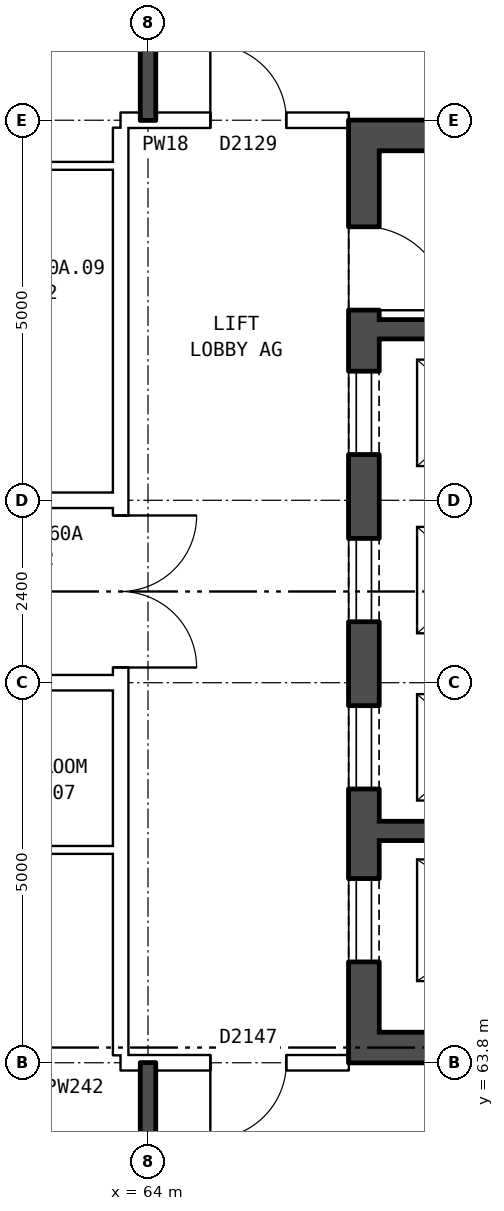
"""IFC4 building model, lengths in metres.
Left out: names, types, materials, properties, quantities, classifications, styles, units other than length and angle.
Written with IfcOpenShell. Run it as: python <this file> out.ifc"""

import sys

from ifc_helpers import new_model, si_unit, direction, frame, frame_2d, origin, place, context, subcontext, project, spatial, rectangle, extrude, element, fill, save


model = new_model("IFC4")
c1 = context("Model", 3, precision=1e-05, world=origin(), true_north=direction((0.0, 1.0)))
c2 = subcontext(c1, "Body", "Model", "MODEL_VIEW")
j1 = project(units=[si_unit("LENGTHUNIT", "METRE"), si_unit("PLANEANGLEUNIT", "RADIAN")], contexts=[c1])
p1 = place(None, origin())
s1 = spatial("IfcSite", under=j1, at=p1, CompositionType="ELEMENT")
p2 = place(p1, origin())
s2 = spatial("IfcBuilding", under=s1, at=p2, CompositionType="ELEMENT")
p3 = place(p2, frame((0.0, 0.0, 212.1)))
s3 = spatial("IfcBuildingStorey", under=s2, at=p3, CompositionType="ELEMENT", Elevation=212.1)
p4 = place(p3, frame((66.84, 63.8, 0.0), z_axis=(0.0, 0.0, 1.0), x_axis=(0.0, 1.0, 0.0)))
e1 = element("IfcWall", 1, at=p4, inside=s3, PredefinedType="SHEAR", context=c2, shape_type="SweptSolid", body=[
    extrude(rectangle(XDim=12.4, YDim=0.4, at=frame_2d((6.2, 0.0))), origin(), (0.0, 0.0, 1.0), 2.85),
])
p5 = place(p4, frame((1.325, 0.0, 0.0)))
e2 = element("IfcOpeningElement", 2, at=p5, cuts=e1, PredefinedType="OPENING", context=c2, shape_type="SweptSolid", body=[
    extrude(rectangle(XDim=1.1, YDim=2.1, at=frame_2d((0.55, 1.05))), frame((0.0, 0.21, 0.0), z_axis=(0.0, -1.0, 0.0), x_axis=(1.0, 0.0, 0.0)), (0.0, 0.0, 1.0), 0.42),
])
p6 = place(p4, frame((3.6, 0.0, 0.0)))
e3 = element("IfcOpeningElement", 3, at=p6, cuts=e1, PredefinedType="OPENING", context=c2, shape_type="SweptSolid", body=[
    extrude(rectangle(XDim=1.1, YDim=2.1, at=frame_2d((0.55, 1.05))), frame((0.0, 0.21, 0.0), z_axis=(0.0, -1.0, 0.0), x_axis=(1.0, 0.0, 0.0)), (0.0, 0.0, 1.0), 0.42),
])
p7 = place(p4, frame((5.8, 0.0, 0.0)))
e4 = element("IfcOpeningElement", 4, at=p7, cuts=e1, PredefinedType="OPENING", context=c2, shape_type="SweptSolid", body=[
    extrude(rectangle(XDim=1.1, YDim=2.1, at=frame_2d((0.55, 1.05))), frame((0.0, 0.21, 0.0), z_axis=(0.0, -1.0, 0.0), x_axis=(1.0, 0.0, 0.0)), (0.0, 0.0, 1.0), 0.42),
])
p8 = place(p4, frame((8.0, 0.0, 0.0)))
e5 = element("IfcOpeningElement", 5, at=p8, cuts=e1, PredefinedType="OPENING", context=c2, shape_type="SweptSolid", body=[
    extrude(rectangle(XDim=1.1, YDim=2.1, at=frame_2d((0.55, 1.05))), frame((0.0, 0.21, 0.0), z_axis=(0.0, -1.0, 0.0), x_axis=(1.0, 0.0, 0.0)), (0.0, 0.0, 1.0), 0.42),
])
p9 = place(p4, frame((9.9, 0.0, 0.0)))
e6 = element("IfcOpeningElement", 6, at=p9, cuts=e1, PredefinedType="OPENING", context=c2, shape_type="SweptSolid", body=[
    extrude(rectangle(XDim=1.1, YDim=2.1, at=frame_2d((0.55, 1.05))), frame((0.0, 0.21, 0.0), z_axis=(0.0, -1.0, 0.0), x_axis=(1.0, 0.0, 0.0)), (0.0, 0.0, 1.0), 0.42),
])
for number, where, z_axis, x_axis in (
    (7, (67.04, 64.0, 0.0), (0.0, 0.0, 1.0), (1.0, 0.0, 0.0)),
    (8, (67.04, 76.0, 0.0), (0.0, 0.0, 1.0), (1.0, 0.0, 0.0)),
):
    element("IfcWall", number, at=place(p3, frame(where, z_axis=z_axis, x_axis=x_axis)), inside=s3, PredefinedType="SHEAR", context=c2, shape_type="SweptSolid", body=[
        extrude(rectangle(XDim=8.2, YDim=0.4, at=frame_2d((4.1, 0.0))), origin(), (0.0, 0.0, 1.0), 2.85),
    ])
p10 = place(p3, frame((67.04, 66.85, 0.0), z_axis=(0.0, 0.0, 1.0), x_axis=(1.0, 0.0, 0.0)))
e9 = element("IfcWall", 9, at=p10, inside=s3, PredefinedType="SHEAR", context=c2, shape_type="SweptSolid", body=[
    extrude(rectangle(XDim=3.595, YDim=0.25, at=frame_2d((1.797, 0.0))), origin(), (0.0, 0.0, 1.0), 2.85),
])
p11 = place(p3, frame((67.04, 73.45, 0.0), z_axis=(0.0, 0.0, 1.0), x_axis=(1.0, 0.0, 0.0)))
e10 = element("IfcWall", 10, at=p11, inside=s3, PredefinedType="SHEAR", context=c2, shape_type="SweptSolid", body=[
    extrude(rectangle(XDim=2.525, YDim=0.25, at=frame_2d((1.262, 0.0))), origin(), (0.0, 0.0, 1.0), 2.85),
])
p12 = place(p3, frame((63.64, 63.9, 0.0), z_axis=(0.0, 0.0, 1.0), x_axis=(0.0, 1.0, 0.0)))
e11 = element("IfcWall", 11, at=p12, inside=s3, PredefinedType="PARTITIONING", context=c2, shape_type="SweptSolid", body=[
    extrude(rectangle(XDim=12.2, YDim=0.2, at=frame_2d((6.1, 0.0))), origin(), (0.0, 0.0, 1.0), 2.85),
])
p13 = place(p12, frame((5.1, 0.0, 0.0)))
e12 = element("IfcOpeningElement", 12, at=p13, cuts=e11, PredefinedType="OPENING", context=c2, shape_type="SweptSolid", body=[
    extrude(rectangle(XDim=2.0, YDim=2.1, at=frame_2d((1.0, 1.05))), frame((0.0, 0.11, 0.0), z_axis=(0.0, -1.0, 0.0), x_axis=(1.0, 0.0, 0.0)), (0.0, 0.0, 1.0), 0.22),
])
p14 = place(p3, frame((63.64, 63.8, 0.0), z_axis=(0.0, 0.0, 1.0), x_axis=(1.0, 0.0, 0.0)))
e13 = element("IfcWall", 13, at=p14, inside=s3, PredefinedType="PARTITIONING", context=c2, shape_type="SweptSolid", body=[
    extrude(rectangle(XDim=3.0, YDim=0.2, at=frame_2d((1.5, 0.0))), origin(), (0.0, 0.0, 1.0), 2.85),
])
p15 = place(p14, frame((1.18, 0.0, 0.0)))
e14 = element("IfcOpeningElement", 14, at=p15, cuts=e13, PredefinedType="OPENING", context=c2, shape_type="SweptSolid", body=[
    extrude(rectangle(XDim=1.0, YDim=2.1, at=frame_2d((0.5, 1.05))), frame((0.0, 0.11, 0.0), z_axis=(0.0, -1.0, 0.0), x_axis=(1.0, 0.0, 0.0)), (0.0, 0.0, 1.0), 0.22),
])
p16 = place(p3, frame((61.0, 66.6, 0.0), z_axis=(0.0, 0.0, 1.0), x_axis=(1.0, 0.0, 0.0)))
e15 = element("IfcWall", 15, at=p16, inside=s3, PredefinedType="PARTITIONING", context=c2, shape_type="SweptSolid", body=[
    extrude(rectangle(XDim=2.64, YDim=0.1, at=frame_2d((1.32, 0.0))), origin(), (0.0, 0.0, 1.0), 2.85),
])
p17 = place(p3, frame((44.36, 68.8, 0.0), z_axis=(0.0, 0.0, 1.0), x_axis=(1.0, 0.0, 0.0)))
e16 = element("IfcWall", 16, at=p17, inside=s3, PredefinedType="PARTITIONING", context=c2, shape_type="SweptSolid", body=[
    extrude(rectangle(XDim=19.28, YDim=0.2, at=frame_2d((9.64, 0.0))), origin(), (0.0, 0.0, 1.0), 2.85),
])
p18 = place(p17, frame((14.64, 0.0, 0.0)))
e17 = element("IfcOpeningElement", 17, at=p18, cuts=e16, PredefinedType="OPENING", context=c2, shape_type="SweptSolid", body=[
    extrude(rectangle(XDim=1.0, YDim=2.1, at=frame_2d((0.5, 1.05))), frame((0.0, 0.11, 0.0), z_axis=(0.0, -1.0, 0.0), x_axis=(1.0, 0.0, 0.0)), (0.0, 0.0, 1.0), 0.22),
])
p19 = place(p17, frame((5.64, 0.0, 0.0)))
e18 = element("IfcOpeningElement", 18, at=p19, cuts=e16, PredefinedType="OPENING", context=c2, shape_type="SweptSolid", body=[
    extrude(rectangle(XDim=1.0, YDim=2.1, at=frame_2d((0.5, 1.05))), frame((0.0, 0.11, 0.0), z_axis=(0.0, -1.0, 0.0), x_axis=(1.0, 0.0, 0.0)), (0.0, 0.0, 1.0), 0.22),
])
p20 = place(p3, frame((44.36, 71.2, 0.0), z_axis=(0.0, 0.0, 1.0), x_axis=(1.0, 0.0, 0.0)))
e19 = element("IfcWall", 19, at=p20, inside=s3, PredefinedType="PARTITIONING", context=c2, shape_type="SweptSolid", body=[
    extrude(rectangle(XDim=19.28, YDim=0.2, at=frame_2d((9.64, 0.0))), origin(), (0.0, 0.0, 1.0), 2.85),
])
p21 = place(p20, frame((14.64, 0.0, 0.0)))
e20 = element("IfcOpeningElement", 20, at=p21, cuts=e19, PredefinedType="OPENING", context=c2, shape_type="SweptSolid", body=[
    extrude(rectangle(XDim=1.0, YDim=2.1, at=frame_2d((0.5, 1.05))), frame((0.0, 0.11, 0.0), z_axis=(0.0, -1.0, 0.0), x_axis=(1.0, 0.0, 0.0)), (0.0, 0.0, 1.0), 0.22),
])
p22 = place(p20, frame((5.64, 0.0, 0.0)))
e21 = element("IfcOpeningElement", 21, at=p22, cuts=e19, PredefinedType="OPENING", context=c2, shape_type="SweptSolid", body=[
    extrude(rectangle(XDim=1.0, YDim=2.1, at=frame_2d((0.5, 1.05))), frame((0.0, 0.11, 0.0), z_axis=(0.0, -1.0, 0.0), x_axis=(1.0, 0.0, 0.0)), (0.0, 0.0, 1.0), 0.22),
])
p23 = place(p3, frame((61.0, 75.6, 0.0), z_axis=(0.0, 0.0, 1.0), x_axis=(1.0, 0.0, 0.0)))
e22 = element("IfcWall", 22, at=p23, inside=s3, PredefinedType="PARTITIONING", context=c2, shape_type="SweptSolid", body=[
    extrude(rectangle(XDim=2.64, YDim=0.1, at=frame_2d((1.32, 0.0))), origin(), (0.0, 0.0, 1.0), 2.85),
])
p24 = place(p3, frame((63.64, 76.2, 0.0), z_axis=(0.0, 0.0, 1.0), x_axis=(1.0, 0.0, 0.0)))
e23 = element("IfcWall", 23, at=p24, inside=s3, PredefinedType="PARTITIONING", context=c2, shape_type="SweptSolid", body=[
    extrude(rectangle(XDim=3.0, YDim=0.2, at=frame_2d((1.5, 0.0))), origin(), (0.0, 0.0, 1.0), 2.85),
])
p25 = place(p24, frame((1.18, 0.0, 0.0)))
e24 = element("IfcOpeningElement", 24, at=p25, cuts=e23, PredefinedType="OPENING", context=c2, shape_type="SweptSolid", body=[
    extrude(rectangle(XDim=1.0, YDim=2.1, at=frame_2d((0.5, 1.05))), frame((0.0, 0.11, 0.0), z_axis=(0.0, -1.0, 0.0), x_axis=(1.0, 0.0, 0.0)), (0.0, 0.0, 1.0), 0.22),
])
for number, where, z_axis, x_axis in (
    (25, (64.0, 54.36, 0.0), (0.0, 0.0, 1.0), (0.0, 1.0, 0.0)),
    (26, (64.0, 76.2, 0.0), (0.0, 0.0, 1.0), (0.0, 1.0, 0.0)),
):
    element("IfcWall", number, at=place(p3, frame(where, z_axis=z_axis, x_axis=x_axis)), inside=s3, PredefinedType="SOLIDWALL", context=c2, shape_type="SweptSolid", body=[
        extrude(rectangle(XDim=9.44, YDim=0.2, at=frame_2d((4.72, 0.0))), origin(), (0.0, 0.0, 1.0), 2.85),
    ])
p26 = place(p5, origin())
e27 = element("IfcDoor", 27, at=p26, inside=s3, OperationType="DOUBLE_DOOR_SLIDING", PredefinedType="DOOR", context=c2, shape_type="SweptSolid", body=[
    extrude(rectangle(XDim=1.1, YDim=2.1, at=frame_2d((0.55, 1.05))), frame((0.0, -0.135, 0.0), z_axis=(0.0, -1.0, 0.0), x_axis=(1.0, 0.0, 0.0)), (0.0, 0.0, 1.0), 0.05),
])
fill(e2, e27)
p27 = place(p6, origin())
e28 = element("IfcDoor", 28, at=p27, inside=s3, OperationType="DOUBLE_DOOR_SLIDING", PredefinedType="DOOR", context=c2, shape_type="SweptSolid", body=[
    extrude(rectangle(XDim=1.1, YDim=2.1, at=frame_2d((0.55, 1.05))), frame((0.0, -0.135, 0.0), z_axis=(0.0, -1.0, 0.0), x_axis=(1.0, 0.0, 0.0)), (0.0, 0.0, 1.0), 0.05),
])
fill(e3, e28)
p28 = place(p7, origin())
e29 = element("IfcDoor", 29, at=p28, inside=s3, OperationType="DOUBLE_DOOR_SLIDING", PredefinedType="DOOR", context=c2, shape_type="SweptSolid", body=[
    extrude(rectangle(XDim=1.1, YDim=2.1, at=frame_2d((0.55, 1.05))), frame((0.0, -0.135, 0.0), z_axis=(0.0, -1.0, 0.0), x_axis=(1.0, 0.0, 0.0)), (0.0, 0.0, 1.0), 0.05),
])
fill(e4, e29)
p29 = place(p8, origin())
e30 = element("IfcDoor", 30, at=p29, inside=s3, OperationType="DOUBLE_DOOR_SLIDING", PredefinedType="DOOR", context=c2, shape_type="SweptSolid", body=[
    extrude(rectangle(XDim=1.1, YDim=2.1, at=frame_2d((0.55, 1.05))), frame((0.0, -0.135, 0.0), z_axis=(0.0, -1.0, 0.0), x_axis=(1.0, 0.0, 0.0)), (0.0, 0.0, 1.0), 0.05),
])
fill(e5, e30)
p30 = place(p9, frame((1.1, 0.0, 0.0), z_axis=(0.0, 0.0, 1.0), x_axis=(-1.0, 0.0, 0.0)))
e31 = element("IfcDoor", 31, at=p30, inside=s3, OperationType="SINGLE_SWING_RIGHT", PredefinedType="DOOR", context=c2, shape_type="SweptSolid", body=[
    extrude(rectangle(XDim=1.1, YDim=2.1, at=frame_2d((0.55, 1.05))), frame((0.0, 0.185, 0.0), z_axis=(0.0, -1.0, 0.0), x_axis=(1.0, 0.0, 0.0)), (0.0, 0.0, 1.0), 0.05),
])
fill(e6, e31)
p31 = place(p13, frame((2.0, 0.0, 0.0), z_axis=(0.0, 0.0, 1.0), x_axis=(-1.0, 0.0, 0.0)))
e32 = element("IfcDoor", 32, at=p31, inside=s3, OperationType="DOUBLE_DOOR_SINGLE_SWING", PredefinedType="DOOR", context=c2, shape_type="SweptSolid", body=[
    extrude(rectangle(XDim=2.0, YDim=2.1, at=frame_2d((1.0, 1.05))), frame((0.0, 0.025, 0.0), z_axis=(0.0, -1.0, 0.0), x_axis=(1.0, 0.0, 0.0)), (0.0, 0.0, 1.0), 0.05),
])
fill(e12, e32)
p32 = place(p15, frame((1.0, 0.0, 0.0), z_axis=(0.0, 0.0, 1.0), x_axis=(-1.0, 0.0, 0.0)))
e33 = element("IfcDoor", 33, at=p32, inside=s3, OperationType="SINGLE_SWING_RIGHT", PredefinedType="DOOR", context=c2, shape_type="SweptSolid", body=[
    extrude(rectangle(XDim=1.0, YDim=2.1, at=frame_2d((0.5, 1.05))), frame((0.0, 0.025, 0.0), z_axis=(0.0, -1.0, 0.0), x_axis=(1.0, 0.0, 0.0)), (0.0, 0.0, 1.0), 0.05),
])
fill(e14, e33)
p33 = place(p25, origin())
e34 = element("IfcDoor", 34, at=p33, inside=s3, OperationType="SINGLE_SWING_LEFT", PredefinedType="DOOR", context=c2, shape_type="SweptSolid", body=[
    extrude(rectangle(XDim=1.0, YDim=2.1, at=frame_2d((0.5, 1.05))), frame((0.0, 0.025, 0.0), z_axis=(0.0, -1.0, 0.0), x_axis=(1.0, 0.0, 0.0)), (0.0, 0.0, 1.0), 0.05),
])
fill(e24, e34)
save(model, sys.argv[1])
